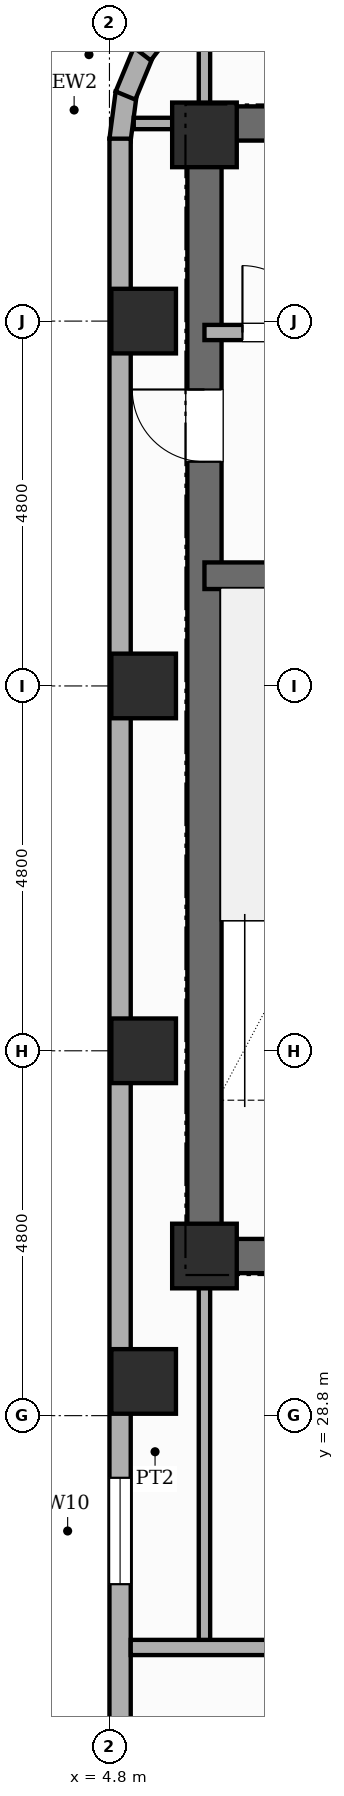
"""IFC4 building model, lengths in metres.
Left out: names, types, materials, properties, quantities, classifications, styles, units other than length and angle.
Written with IfcOpenShell. Run it as: python <this file> out.ifc"""

import sys

from ifc_helpers import new_model, si_unit, direction, frame, frame_2d, origin, origin_2d, place, context, subcontext, project, spatial, rectangle, extrude, element, fill, save


model = new_model("IFC4")
c1 = context("Model", 3, precision=1e-05, world=origin(), true_north=direction((0.0, 1.0)))
c2 = subcontext(c1, "Body", "Model", "MODEL_VIEW")
j1 = project(units=[si_unit("LENGTHUNIT", "METRE"), si_unit("PLANEANGLEUNIT", "RADIAN")], contexts=[c1])
p1 = place(None, origin())
s1 = spatial("IfcSite", under=j1, at=p1, CompositionType="ELEMENT")
p2 = place(p1, origin())
s2 = spatial("IfcBuilding", under=s1, at=p2, CompositionType="ELEMENT")
p3 = place(p2, frame((0.0, 0.0, 203.8)))
s3 = spatial("IfcBuildingStorey", under=s2, at=p3, CompositionType="ELEMENT", Elevation=203.8)
p4 = place(p3, frame((6.05, 30.675, 0.0), z_axis=(0.0, 0.0, 1.0), x_axis=(0.0, 1.0, 0.0)))
e1 = element("IfcWall", 1, at=p4, inside=s3, PredefinedType="SHEAR", context=c2, shape_type="SweptSolid", body=[
    extrude(rectangle(XDim=15.35, YDim=0.45, at=frame_2d((7.675, 0.0))), origin(), (0.0, 0.0, 1.0), 3.6),
])
p5 = place(p4, frame((10.675, 0.0, 0.0)))
e2 = element("IfcOpeningElement", 2, at=p5, cuts=e1, PredefinedType="OPENING", context=c2, shape_type="SweptSolid", body=[
    extrude(rectangle(XDim=0.95, YDim=2.15, at=frame_2d((0.475, 1.075))), frame((0.0, 0.235, 0.0), z_axis=(0.0, -1.0, 0.0), x_axis=(1.0, 0.0, 0.0)), (0.0, 0.0, 1.0), 0.47),
])
p6 = place(p3, frame((6.05, 45.8, 0.0), z_axis=(0.0, 0.0, 1.0), x_axis=(1.0, 0.0, 0.0)))
e3 = element("IfcWall", 3, at=p6, inside=s3, PredefinedType="SHEAR", context=c2, shape_type="SweptSolid", body=[
    extrude(rectangle(XDim=16.7, YDim=0.45, at=frame_2d((8.35, 0.0))), origin(), (0.0, 0.0, 1.0), 3.6),
])
p7 = place(p3, frame((6.05, 30.9, 0.0), z_axis=(0.0, 0.0, 1.0), x_axis=(1.0, 0.0, 0.0)))
e4 = element("IfcWall", 4, at=p7, inside=s3, PredefinedType="SHEAR", context=c2, shape_type="SweptSolid", body=[
    extrude(rectangle(XDim=3.91, YDim=0.45, at=frame_2d((1.955, 0.0))), origin(), (0.0, 0.0, 1.0), 3.6),
])
p8 = place(p3, frame((6.05, 39.85, 0.0), z_axis=(0.0, 0.0, 1.0), x_axis=(1.0, 0.0, 0.0)))
e5 = element("IfcWall", 5, at=p8, inside=s3, PredefinedType="SHEAR", context=c2, shape_type="SweptSolid", body=[
    extrude(rectangle(XDim=3.91, YDim=0.35, at=frame_2d((1.955, 0.0))), origin(), (0.0, 0.0, 1.0), 3.6),
])
for number, where, z_axis, x_axis in (
    (6, (5.25, 29.25, 0.0), (0.0, 0.0, 1.0), (1.0, 0.0, 0.0)),
    (7, (5.25, 33.6, 0.0), (0.0, 0.0, 1.0), (1.0, 0.0, 0.0)),
    (8, (5.25, 38.4, 0.0), (0.0, 0.0, 1.0), (1.0, 0.0, 0.0)),
    (9, (5.25, 43.2, 0.0), (0.0, 0.0, 1.0), (1.0, 0.0, 0.0)),
    (10, (6.05, 30.9, 0.0), (0.0, 0.0, 1.0), (1.0, 0.0, 0.0)),
    (11, (6.05, 45.65, 0.0), (0.0, 0.0, 1.0), (1.0, 0.0, 0.0)),
):
    element("IfcColumn", number, at=place(p3, frame(where, z_axis=z_axis, x_axis=x_axis)), inside=s3, PredefinedType="COLUMN", context=c2, shape_type="SweptSolid", body=[
        extrude(rectangle(XDim=0.85, YDim=0.85, at=origin_2d()), origin(), (0.0, 0.0, 1.0), 3.6),
    ])
for number, where, z_axis, x_axis in (
    (12, (4.939, 45.582, 0.0), (0.0, 0.0, 1.0), (0.131, 0.991, 0.0)),
    (13, (5.011, 46.167, 0.0), (0.0, 0.0, 1.0), (0.383, 0.924, 0.0)),
    (14, (5.233, 46.715, 0.0), (0.0, 0.0, 1.0), (0.609, 0.793, 0.0)),
):
    element("IfcWall", number, at=place(p3, frame(where, z_axis=z_axis, x_axis=x_axis)), inside=s3, PredefinedType="STANDARD", context=c2, shape_type="SweptSolid", body=[
        extrude(rectangle(XDim=0.626, YDim=0.28, at=frame_2d((0.313, 0.0))), origin(), (0.0, 0.0, 1.0), 3.38),
    ])
p9 = place(p3, frame((4.94, 12.0, 0.0), z_axis=(0.0, 0.0, 1.0), x_axis=(0.0, 1.0, 0.0)))
e15 = element("IfcWall", 15, at=p9, inside=s3, PredefinedType="STANDARD", context=c2, shape_type="SweptSolid", body=[
    extrude(rectangle(XDim=33.6, YDim=0.28, at=frame_2d((16.8, 0.0))), origin(), (0.0, 0.0, 1.0), 2.66),
])
p10 = place(p9, frame((14.583, 0.0, 0.65)))
e16 = element("IfcOpeningElement", 16, at=p10, cuts=e15, PredefinedType="OPENING", context=c2, shape_type="SweptSolid", body=[
    extrude(rectangle(XDim=1.4, YDim=1.1, at=frame_2d((0.7, 0.55))), frame((0.0, 0.15, 0.0), z_axis=(0.0, -1.0, 0.0), x_axis=(1.0, 0.0, 0.0)), (0.0, 0.0, 1.0), 0.3),
])
p11 = place(p9, frame((0.308, 0.0, 0.65)))
e17 = element("IfcOpeningElement", 17, at=p11, cuts=e15, PredefinedType="OPENING", context=c2, shape_type="SweptSolid", body=[
    extrude(rectangle(XDim=1.4, YDim=1.1, at=frame_2d((0.7, 0.55))), frame((0.0, 0.15, 0.0), z_axis=(0.0, -1.0, 0.0), x_axis=(1.0, 0.0, 0.0)), (0.0, 0.0, 1.0), 0.3),
])
p12 = place(p9, frame((8.9, 0.0, 0.65)))
e18 = element("IfcOpeningElement", 18, at=p12, cuts=e15, PredefinedType="OPENING", context=c2, shape_type="SweptSolid", body=[
    extrude(rectangle(XDim=1.4, YDim=1.1, at=frame_2d((0.7, 0.55))), frame((0.0, 0.15, 0.0), z_axis=(0.0, -1.0, 0.0), x_axis=(1.0, 0.0, 0.0)), (0.0, 0.0, 1.0), 0.3),
])
p13 = place(p3, frame((6.05, 43.05, 0.0), z_axis=(0.0, 0.0, 1.0), x_axis=(1.0, 0.0, 0.0)))
e19 = element("IfcWall", 19, at=p13, inside=s3, PredefinedType="POLYGONAL", context=c2, shape_type="SweptSolid", body=[
    extrude(rectangle(XDim=3.91, YDim=0.2, at=frame_2d((1.955, 0.0))), origin(), (0.0, 0.0, 1.0), 2.66),
])
p14 = place(p13, frame((0.5, 0.0, 0.0)))
e20 = element("IfcOpeningElement", 20, at=p14, cuts=e19, PredefinedType="OPENING", context=c2, shape_type="SweptSolid", body=[
    extrude(rectangle(XDim=0.88, YDim=2.1, at=frame_2d((0.44, 1.05))), frame((0.0, 0.11, 0.0), z_axis=(0.0, -1.0, 0.0), x_axis=(1.0, 0.0, 0.0)), (0.0, 0.0, 1.0), 0.22),
])
p15 = place(p13, frame((2.35, 0.0, 0.0)))
e21 = element("IfcOpeningElement", 21, at=p15, cuts=e19, PredefinedType="OPENING", context=c2, shape_type="SweptSolid", body=[
    extrude(rectangle(XDim=0.88, YDim=2.1, at=frame_2d((0.44, 1.05))), frame((0.0, 0.11, 0.0), z_axis=(0.0, -1.0, 0.0), x_axis=(1.0, 0.0, 0.0)), (0.0, 0.0, 1.0), 0.22),
])
p16 = place(p3, frame((6.05, 25.75, 0.0), z_axis=(0.0, 0.0, 1.0), x_axis=(0.0, 1.0, 0.0)))
e22 = element("IfcWall", 22, at=p16, inside=s3, PredefinedType="PARTITIONING", context=c2, shape_type="SweptSolid", body=[
    extrude(rectangle(XDim=5.15, YDim=0.15, at=frame_2d((2.575, 0.0))), origin(), (0.0, 0.0, 1.0), 3.38),
])
p17 = place(p3, frame((5.08, 25.75, 0.0), z_axis=(0.0, 0.0, 1.0), x_axis=(1.0, 0.0, 0.0)))
e23 = element("IfcWall", 23, at=p17, inside=s3, PredefinedType="PARTITIONING", context=c2, shape_type="SweptSolid", body=[
    extrude(rectangle(XDim=8.52, YDim=0.2, at=frame_2d((4.26, 0.0))), origin(), (0.0, 0.0, 1.0), 3.38),
])
p18 = place(p3, frame((5.12, 45.8, 0.0), z_axis=(0.0, 0.0, 1.0), x_axis=(1.0, 0.0, 0.0)))
e24 = element("IfcWall", 24, at=p18, inside=s3, PredefinedType="PARTITIONING", context=c2, shape_type="SweptSolid", body=[
    extrude(rectangle(XDim=0.93, YDim=0.15, at=frame_2d((0.465, 0.0))), origin(), (0.0, 0.0, 1.0), 3.38),
])
p19 = place(p3, frame((6.05, 45.8, 0.0), z_axis=(0.0, 0.0, 1.0), x_axis=(0.0, 1.0, 0.0)))
e25 = element("IfcWall", 25, at=p19, inside=s3, PredefinedType="PARTITIONING", context=c2, shape_type="SweptSolid", body=[
    extrude(rectangle(XDim=1.5, YDim=0.15, at=frame_2d((0.75, 0.0))), origin(), (0.0, 0.0, 1.0), 3.38),
])
p20 = place(p10, origin())
e26 = element("IfcWindow", 26, at=p20, inside=s3, PartitioningType="SINGLE_PANEL", PredefinedType="WINDOW", context=c2, shape_type="SweptSolid", body=[
    extrude(rectangle(XDim=1.4, YDim=1.1, at=frame_2d((0.7, 0.55))), frame((0.0, 0.03, 0.0), z_axis=(0.0, -1.0, 0.0), x_axis=(1.0, 0.0, 0.0)), (0.0, 0.0, 1.0), 0.06),
])
fill(e16, e26)
p21 = place(p5, origin())
e27 = element("IfcDoor", 27, at=p21, inside=s3, OperationType="SINGLE_SWING_RIGHT", PredefinedType="DOOR", context=c2, shape_type="SweptSolid", body=[
    extrude(rectangle(XDim=0.95, YDim=2.15, at=frame_2d((0.475, 1.075))), frame((0.0, 0.025, 0.0), z_axis=(0.0, -1.0, 0.0), x_axis=(1.0, 0.0, 0.0)), (0.0, 0.0, 1.0), 0.05),
])
fill(e2, e27)
p22 = place(p14, origin())
e28 = element("IfcDoor", 28, at=p22, inside=s3, OperationType="SINGLE_SWING_LEFT", PredefinedType="DOOR", context=c2, shape_type="SweptSolid", body=[
    extrude(rectangle(XDim=0.88, YDim=2.1, at=frame_2d((0.44, 1.05))), frame((0.0, 0.025, 0.0), z_axis=(0.0, -1.0, 0.0), x_axis=(1.0, 0.0, 0.0)), (0.0, 0.0, 1.0), 0.05),
])
fill(e20, e28)
save(model, sys.argv[1])
